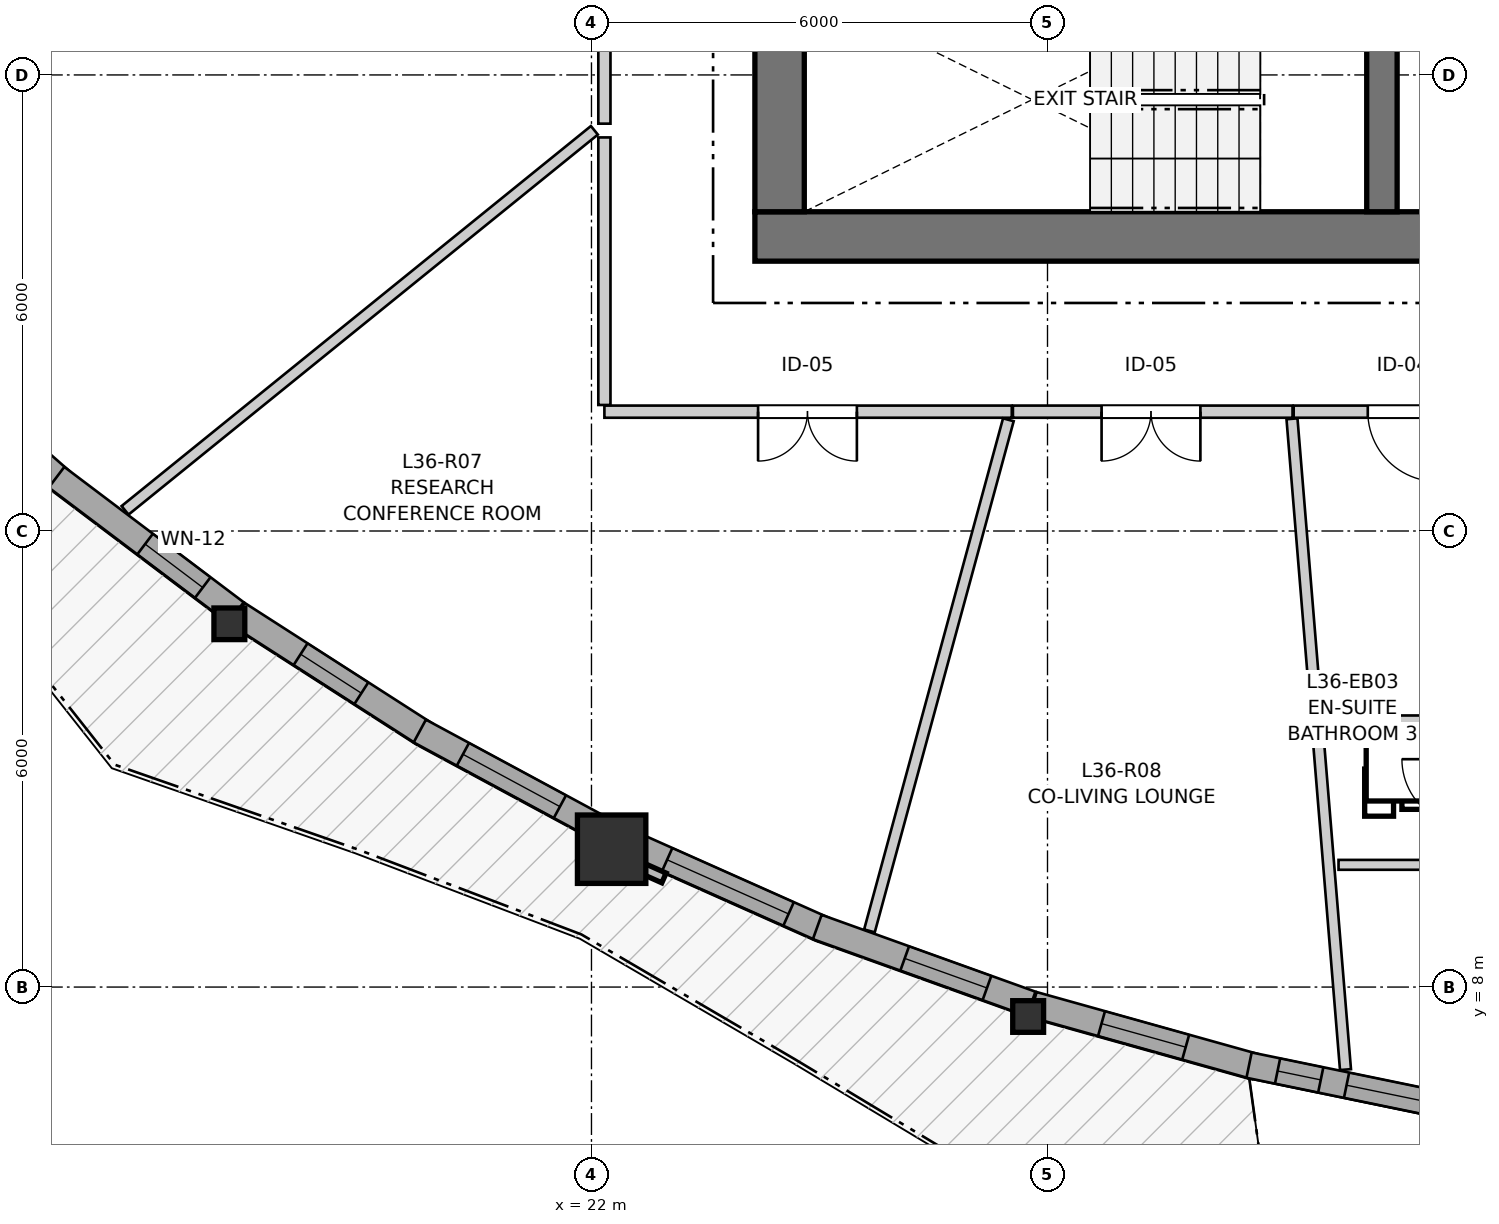
"""IFC4 building model, lengths in metres.
Left out: names, types, materials, properties, quantities, classifications, styles, units other than length and angle.
Written with IfcOpenShell. Run it as: python <this file> out.ifc"""

import sys

from ifc_helpers import new_model, si_unit, direction, frame, frame_2d, origin, origin_2d, place, context, subcontext, project, spatial, rectangle, i_section, extrude, source, transform, mapped, element, fill, save


model = new_model("IFC4")
c1 = context("Model", 3, precision=1e-05, world=origin(), true_north=direction((0.0, 1.0)))
c2 = subcontext(c1, "Body", "Model", "MODEL_VIEW")
j1 = project(units=[si_unit("LENGTHUNIT", "METRE"), si_unit("PLANEANGLEUNIT", "RADIAN")], contexts=[c1])
p1 = place(None, origin())
s1 = spatial("IfcSite", under=j1, at=p1, CompositionType="ELEMENT")
p2 = place(p1, origin())
s2 = spatial("IfcBuilding", under=s1, at=p2, CompositionType="ELEMENT")
p3 = place(p2, frame((0.0, 0.0, 121.6)))
s3 = spatial("IfcBuildingStorey", under=s2, at=p3, CompositionType="ELEMENT", Elevation=121.6)
p4 = place(p3, frame((24.15, 17.875, 0.0), z_axis=(0.0, 0.0, 1.0), x_axis=(1.0, 0.0, 0.0)))
e1 = element("IfcWall", 1, at=p4, inside=s3, PredefinedType="SHEAR", context=c2, shape_type="SweptSolid", body=[
    extrude(rectangle(XDim=12.4, YDim=0.65, at=frame_2d((6.2, 0.0))), origin(), (0.0, 0.0, 1.0), 2.95),
])
p5 = place(p3, frame((24.475, 33.8, 0.0), z_axis=(0.0, 0.0, 1.0), x_axis=(0.0, -1.0, 0.0)))
e2 = element("IfcWall", 2, at=p5, inside=s3, PredefinedType="SHEAR", context=c2, shape_type="SweptSolid", body=[
    extrude(rectangle(XDim=15.6, YDim=0.65, at=frame_2d((7.8, 0.0))), origin(), (0.0, 0.0, 1.0), 2.95),
])
p6 = place(p5, frame((7.05, 0.0, 0.0)))
e3 = element("IfcOpeningElement", 3, at=p6, cuts=e2, PredefinedType="OPENING", context=c2, shape_type="SweptSolid", body=[
    extrude(rectangle(XDim=1.5, YDim=2.15, at=frame_2d((0.75, 1.075))), frame((0.0, 0.335, 0.0), z_axis=(0.0, -1.0, 0.0), x_axis=(1.0, 0.0, 0.0)), (0.0, 0.0, 1.0), 0.67),
])
p7 = place(p5, frame((3.52, 0.0, 0.0)))
e4 = element("IfcOpeningElement", 4, at=p7, cuts=e2, PredefinedType="OPENING", context=c2, shape_type="SweptSolid", body=[
    extrude(rectangle(XDim=0.86, YDim=2.05, at=frame_2d((0.43, 1.025))), frame((0.0, 0.335, 0.0), z_axis=(0.0, -1.0, 0.0), x_axis=(1.0, 0.0, 0.0)), (0.0, 0.0, 1.0), 0.67),
])
p8 = place(p5, frame((11.22, 0.0, 0.0)))
e5 = element("IfcOpeningElement", 5, at=p8, cuts=e2, PredefinedType="OPENING", context=c2, shape_type="SweptSolid", body=[
    extrude(rectangle(XDim=0.86, YDim=2.05, at=frame_2d((0.43, 1.025))), frame((0.0, 0.335, 0.0), z_axis=(0.0, -1.0, 0.0), x_axis=(1.0, 0.0, 0.0)), (0.0, 0.0, 1.0), 0.67),
])
p9 = place(p3, frame((32.4, 18.2, 0.0), z_axis=(0.0, 0.0, 1.0), x_axis=(0.0, 1.0, 0.0)))
e6 = element("IfcWall", 6, at=p9, inside=s3, PredefinedType="SHEAR", context=c2, shape_type="SweptSolid", body=[
    extrude(rectangle(XDim=2.95, YDim=0.4, at=frame_2d((1.475, 0.0))), origin(), (0.0, 0.0, 1.0), 2.95),
])
m1 = source(origin(), c2, "Body", "SweptSolid", [
    extrude(i_section(OverallWidth=0.406, OverallDepth=0.416, WebThickness=0.027, FlangeThickness=0.044, FilletRadius=0.015, at=origin_2d()), origin(), (0.0, 0.0, 1.0), 2.95),
])
p10 = place(p3, frame((17.236, 12.779, 0.0), z_axis=(0.0, 0.0, 1.0), x_axis=(1.0, 0.0, 0.0)))
e7 = element("IfcColumn", 7, at=p10, inside=s3, PredefinedType="PILASTER", context=c2, shape_type="MappedRepresentation", body=[
    mapped(m1, transform((0.0, 0.0, 0.0), x_axis=(1.0, 0.0, 0.0), y_axis=(0.0, 1.0, 0.0), z_axis=(0.0, 0.0, 1.0), scale=1.0)),
])
m2 = source(origin(), c2, "Body", "SweptSolid", [
    extrude(rectangle(XDim=0.9, YDim=0.9, at=origin_2d()), origin(), (0.0, 0.0, 1.0), 2.95),
])
p11 = place(p3, frame((22.265, 9.814, 0.0), z_axis=(0.0, 0.0, 1.0), x_axis=(1.0, 0.0, 0.0)))
e8 = element("IfcColumn", 8, at=p11, inside=s3, PredefinedType="COLUMN", context=c2, shape_type="MappedRepresentation", body=[
    mapped(m2, transform((0.0, 0.0, 0.0), x_axis=(1.0, 0.0, 0.0), y_axis=(0.0, 1.0, 0.0), z_axis=(0.0, 0.0, 1.0), scale=1.0)),
])
p12 = place(p3, frame((27.746, 7.613, 0.0), z_axis=(0.0, 0.0, 1.0), x_axis=(1.0, 0.0, 0.0)))
e9 = element("IfcColumn", 9, at=p12, inside=s3, PredefinedType="PILASTER", context=c2, shape_type="MappedRepresentation", body=[
    mapped(m1, transform((0.0, 0.0, 0.0), x_axis=(1.0, 0.0, 0.0), y_axis=(0.0, 1.0, 0.0), z_axis=(0.0, 0.0, 1.0), scale=1.0)),
])
p13 = place(p3, frame((12.942, 16.485, 0.0), z_axis=(0.0, 0.0, 1.0), x_axis=(0.751427478967, -0.659815689305, 0.0)))
e10 = element("IfcWall", 10, at=p13, inside=s3, PredefinedType="SOLIDWALL", context=c2, shape_type="SweptSolid", body=[
    extrude(rectangle(XDim=2.78, YDim=0.34, at=frame_2d((1.39, 0.0))), origin(), (0.0, 0.0, 1.0), 2.48),
])
p14 = place(p13, frame((0.685, 0.0, 0.82)))
e11 = element("IfcOpeningElement", 11, at=p14, cuts=e10, PredefinedType="OPENING", context=c2, shape_type="SweptSolid", body=[
    extrude(rectangle(XDim=1.4, YDim=1.35, at=frame_2d((0.7, 0.675))), frame((0.0, 0.18, 0.0), z_axis=(0.0, -1.0, 0.0), x_axis=(1.0, 0.0, 0.0)), (0.0, 0.0, 1.0), 0.36),
])
p15 = place(p3, frame((14.962, 14.707, 0.0), z_axis=(0.0, 0.0, 1.0), x_axis=(0.798341968257, -0.602204368732, 0.0)))
e12 = element("IfcWall", 12, at=p15, inside=s3, PredefinedType="SOLIDWALL", context=c2, shape_type="SweptSolid", body=[
    extrude(rectangle(XDim=2.956, YDim=0.34, at=frame_2d((1.478, 0.0))), origin(), (0.0, 0.0, 1.0), 2.48),
])
p16 = place(p15, frame((1.46, 0.0, 0.82)))
e13 = element("IfcOpeningElement", 13, at=p16, cuts=e12, PredefinedType="OPENING", context=c2, shape_type="SweptSolid", body=[
    extrude(rectangle(XDim=0.95, YDim=1.35, at=frame_2d((0.475, 0.675))), frame((0.0, 0.18, 0.0), z_axis=(0.0, -1.0, 0.0), x_axis=(1.0, 0.0, 0.0)), (0.0, 0.0, 1.0), 0.36),
])
p17 = place(p3, frame((17.344, 12.912, 0.0), z_axis=(0.0, 0.0, 1.0), x_axis=(0.841496750769, -0.540262175657, 0.0)))
e14 = element("IfcWall", 14, at=p17, inside=s3, PredefinedType="SOLIDWALL", context=c2, shape_type="SweptSolid", body=[
    extrude(rectangle(XDim=2.939, YDim=0.34, at=frame_2d((1.47, 0.0))), origin(), (0.0, 0.0, 1.0), 2.48),
])
p18 = place(p17, frame((0.985, 0.0, 0.82)))
e15 = element("IfcOpeningElement", 15, at=p18, cuts=e14, PredefinedType="OPENING", context=c2, shape_type="SweptSolid", body=[
    extrude(rectangle(XDim=0.95, YDim=1.35, at=frame_2d((0.475, 0.675))), frame((0.0, 0.18, 0.0), z_axis=(0.0, -1.0, 0.0), x_axis=(1.0, 0.0, 0.0)), (0.0, 0.0, 1.0), 0.36),
])
p19 = place(p3, frame((19.741, 11.369, 0.0), z_axis=(0.0, 0.0, 1.0), x_axis=(0.88007734826, -0.474830349788, 0.0)))
e16 = element("IfcWall", 16, at=p19, inside=s3, PredefinedType="SOLIDWALL", context=c2, shape_type="SweptSolid", body=[
    extrude(rectangle(XDim=2.73, YDim=0.34, at=frame_2d((1.365, 0.0))), origin(), (0.0, 0.0, 1.0), 2.48),
])
p20 = place(p19, frame((0.645, 0.0, 0.82)))
e17 = element("IfcOpeningElement", 17, at=p20, cuts=e16, PredefinedType="OPENING", context=c2, shape_type="SweptSolid", body=[
    extrude(rectangle(XDim=1.45, YDim=1.25, at=frame_2d((0.725, 0.625))), frame((0.0, 0.18, 0.0), z_axis=(0.0, -1.0, 0.0), x_axis=(1.0, 0.0, 0.0)), (0.0, 0.0, 1.0), 0.36),
])
p21 = place(p3, frame((22.544, 9.875, 0.0), z_axis=(0.0, 0.0, 1.0), x_axis=(0.913404185574, -0.407053797153, 0.0)))
e18 = element("IfcWall", 18, at=p21, inside=s3, PredefinedType="SOLIDWALL", context=c2, shape_type="SweptSolid", body=[
    extrude(rectangle(XDim=2.746, YDim=0.34, at=frame_2d((1.373, 0.0))), origin(), (0.0, 0.0, 1.0), 2.48),
])
p22 = place(p21, frame((0.493, 0.0, 0.82)))
e19 = element("IfcOpeningElement", 19, at=p22, cuts=e18, PredefinedType="OPENING", context=c2, shape_type="SweptSolid", body=[
    extrude(rectangle(XDim=1.75, YDim=1.3, at=frame_2d((0.875, 0.65))), frame((0.0, 0.18, 0.0), z_axis=(0.0, -1.0, 0.0), x_axis=(1.0, 0.0, 0.0)), (0.0, 0.0, 1.0), 0.36),
])
p23 = place(p3, frame((24.971, 8.79, 0.0), z_axis=(0.0, 0.0, 1.0), x_axis=(0.941086086789, -0.338167084814, 0.0)))
e20 = element("IfcWall", 20, at=p23, inside=s3, PredefinedType="SOLIDWALL", context=c2, shape_type="SweptSolid", body=[
    extrude(rectangle(XDim=2.99, YDim=0.34, at=frame_2d((1.495, 0.0))), origin(), (0.0, 0.0, 1.0), 2.48),
])
p24 = place(p23, frame((1.222, 0.0, 0.82)))
e21 = element("IfcOpeningElement", 21, at=p24, cuts=e20, PredefinedType="OPENING", context=c2, shape_type="SweptSolid", body=[
    extrude(rectangle(XDim=1.15, YDim=1.2, at=frame_2d((0.575, 0.6))), frame((0.0, 0.18, 0.0), z_axis=(0.0, -1.0, 0.0), x_axis=(1.0, 0.0, 0.0)), (0.0, 0.0, 1.0), 0.36),
])
p25 = place(p3, frame((27.811, 7.771, 0.0), z_axis=(0.0, 0.0, 1.0), x_axis=(0.963039905189, -0.269358758934, 0.0)))
e22 = element("IfcWall", 22, at=p25, inside=s3, PredefinedType="SOLIDWALL", context=c2, shape_type="SweptSolid", body=[
    extrude(rectangle(XDim=3.039, YDim=0.34, at=frame_2d((1.52, 0.0))), origin(), (0.0, 0.0, 1.0), 2.48),
])
p26 = place(p25, frame((0.935, 0.0, 0.82)))
e23 = element("IfcOpeningElement", 23, at=p26, cuts=e22, PredefinedType="OPENING", context=c2, shape_type="SweptSolid", body=[
    extrude(rectangle(XDim=1.15, YDim=1.2, at=frame_2d((0.575, 0.6))), frame((0.0, 0.18, 0.0), z_axis=(0.0, -1.0, 0.0), x_axis=(1.0, 0.0, 0.0)), (0.0, 0.0, 1.0), 0.36),
])
p27 = place(p3, frame((30.652, 6.973, 0.0), z_axis=(0.0, 0.0, 1.0), x_axis=(0.979418300652, -0.201841007595, 0.0)))
e24 = element("IfcWall", 24, at=p27, inside=s3, PredefinedType="SOLIDWALL", context=c2, shape_type="SweptSolid", body=[
    extrude(rectangle(XDim=2.893, YDim=0.34, at=frame_2d((1.447, 0.0))), origin(), (0.0, 0.0, 1.0), 2.48),
])
p28 = place(p27, frame((0.383, 0.0, 0.82)))
e25 = element("IfcOpeningElement", 25, at=p28, cuts=e24, PredefinedType="OPENING", context=c2, shape_type="SweptSolid", body=[
    extrude(rectangle(XDim=0.58, YDim=1.35, at=frame_2d((0.29, 0.675))), frame((0.0, 0.18, 0.0), z_axis=(0.0, -1.0, 0.0), x_axis=(1.0, 0.0, 0.0)), (0.0, 0.0, 1.0), 0.36),
])
p29 = place(p27, frame((1.31, 0.0, 0.82)))
e26 = element("IfcOpeningElement", 26, at=p29, cuts=e24, PredefinedType="OPENING", context=c2, shape_type="SweptSolid", body=[
    extrude(rectangle(XDim=1.15, YDim=1.2, at=frame_2d((0.575, 0.6))), frame((0.0, 0.18, 0.0), z_axis=(0.0, -1.0, 0.0), x_axis=(1.0, 0.0, 0.0)), (0.0, 0.0, 1.0), 0.36),
])
p30 = place(p3, frame((27.53, 15.57, 0.0), z_axis=(0.0, 0.0, 1.0), x_axis=(-1.0, 0.0, 0.0)))
e27 = element("IfcWall", 27, at=p30, inside=s3, PredefinedType="PARTITIONING", context=c2, shape_type="SweptSolid", body=[
    extrude(rectangle(XDim=5.36, YDim=0.16, at=frame_2d((2.68, 0.0))), origin(), (0.0, 0.0, 1.0), 2.95),
])
p31 = place(p30, frame((2.038, 0.0, 0.0)))
e28 = element("IfcOpeningElement", 28, at=p31, cuts=e27, PredefinedType="OPENING", context=c2, shape_type="SweptSolid", body=[
    extrude(rectangle(XDim=1.3, YDim=2.1, at=frame_2d((0.65, 1.05))), frame((0.0, 0.09, 0.0), z_axis=(0.0, -1.0, 0.0), x_axis=(1.0, 0.0, 0.0)), (0.0, 0.0, 1.0), 0.18),
])
p32 = place(p3, frame((22.17, 19.359, 0.0), z_axis=(0.0, 0.0, 1.0), x_axis=(0.0, 1.0, 0.0)))
e29 = element("IfcWall", 29, at=p32, inside=s3, PredefinedType="PARTITIONING", context=c2, shape_type="SweptSolid", body=[
    extrude(rectangle(XDim=4.791, YDim=0.16, at=frame_2d((2.396, 0.0))), origin(), (0.0, 0.0, 1.0), 2.95),
])
p33 = place(p32, frame((1.445, 0.0, 0.0)))
e30 = element("IfcOpeningElement", 30, at=p33, cuts=e29, PredefinedType="OPENING", context=c2, shape_type="SweptSolid", body=[
    extrude(rectangle(XDim=1.3, YDim=2.1, at=frame_2d((0.65, 1.05))), frame((0.0, 0.09, 0.0), z_axis=(0.0, -1.0, 0.0), x_axis=(1.0, 0.0, 0.0)), (0.0, 0.0, 1.0), 0.18),
])
p34 = place(p3, frame((31.224, 15.57, 0.0), z_axis=(0.0, 0.0, 1.0), x_axis=(-1.0, 0.0, 0.0)))
e31 = element("IfcWall", 31, at=p34, inside=s3, PredefinedType="PARTITIONING", context=c2, shape_type="SweptSolid", body=[
    extrude(rectangle(XDim=3.679, YDim=0.16, at=frame_2d((1.84, 0.0))), origin(), (0.0, 0.0, 1.0), 2.95),
])
p35 = place(p34, frame((1.212, 0.0, 0.0)))
e32 = element("IfcOpeningElement", 32, at=p35, cuts=e31, PredefinedType="OPENING", context=c2, shape_type="SweptSolid", body=[
    extrude(rectangle(XDim=1.3, YDim=2.1, at=frame_2d((0.65, 1.05))), frame((0.0, 0.09, 0.0), z_axis=(0.0, -1.0, 0.0), x_axis=(1.0, 0.0, 0.0)), (0.0, 0.0, 1.0), 0.18),
])
p36 = place(p3, frame((34.108, 15.57, 0.0), z_axis=(0.0, 0.0, 1.0), x_axis=(-1.0, 0.0, 0.0)))
e33 = element("IfcWall", 33, at=p36, inside=s3, PredefinedType="PARTITIONING", context=c2, shape_type="SweptSolid", body=[
    extrude(rectangle(XDim=2.869, YDim=0.16, at=frame_2d((1.435, 0.0))), origin(), (0.0, 0.0, 1.0), 2.95),
])
p37 = place(p36, frame((0.974, 0.0, 0.0)))
e34 = element("IfcOpeningElement", 34, at=p37, cuts=e33, PredefinedType="OPENING", context=c2, shape_type="SweptSolid", body=[
    extrude(rectangle(XDim=0.92, YDim=2.1, at=frame_2d((0.46, 1.05))), frame((0.0, 0.09, 0.0), z_axis=(0.0, -1.0, 0.0), x_axis=(1.0, 0.0, 0.0)), (0.0, 0.0, 1.0), 0.18),
])
p38 = place(p3, frame((31.217, 15.476, 0.0), z_axis=(0.0, 0.0, 1.0), x_axis=(0.081928316893, -0.996638224679, 0.0)))
e35 = element("IfcWall", 35, at=p38, inside=s3, PredefinedType="PARTITIONING", context=c2, shape_type="SweptSolid", body=[
    extrude(rectangle(XDim=8.591, YDim=0.145, at=frame_2d((4.295, 0.0))), origin(), (0.0, 0.0, 1.0), 2.95),
])
p39 = place(p3, frame((15.863, 14.272, 0.0), z_axis=(0.0, 0.0, 1.0), x_axis=(0.77720694169, 0.629245079273, 0.0)))
e36 = element("IfcWall", 36, at=p39, inside=s3, PredefinedType="PARTITIONING", context=c2, shape_type="SweptSolid", body=[
    extrude(rectangle(XDim=7.945, YDim=0.145, at=frame_2d((3.972, 0.0))), origin(), (0.0, 0.0, 1.0), 2.95),
])
p40 = place(p3, frame((25.657, 8.739, 0.0), z_axis=(0.0, 0.0, 1.0), x_axis=(0.26231095786, 0.964983399539, 0.0)))
e37 = element("IfcWall", 37, at=p40, inside=s3, PredefinedType="PARTITIONING", context=c2, shape_type="SweptSolid", body=[
    extrude(rectangle(XDim=6.968, YDim=0.145, at=frame_2d((3.484, 0.0))), origin(), (0.0, 0.0, 1.0), 2.95),
])
p41 = place(p3, frame((22.17, 15.658, 0.0), z_axis=(0.0, 0.0, 1.0), x_axis=(0.0, 1.0, 0.0)))
e38 = element("IfcWall", 38, at=p41, inside=s3, PredefinedType="PARTITIONING", context=c2, shape_type="SweptSolid", body=[
    extrude(rectangle(XDim=3.52, YDim=0.16, at=frame_2d((1.76, 0.0))), origin(), (0.0, 0.0, 1.0), 2.95),
])
p42 = place(p3, frame((31.743, 11.508, 0.0), z_axis=(0.0, 0.0, 1.0), x_axis=(1.0, 0.0, 0.0)))
e39 = element("IfcWall", 39, at=p42, inside=s3, PredefinedType="PARTITIONING", context=c2, shape_type="SweptSolid", body=[
    extrude(rectangle(XDim=1.727, YDim=0.13, at=frame_2d((0.864, 0.0))), origin(), (0.0, 0.0, 1.0), 2.95),
])
p43 = place(p3, frame((31.829, 9.608, 0.0), z_axis=(0.0, 0.0, 1.0), x_axis=(1.0, 0.0, 0.0)))
e40 = element("IfcWall", 40, at=p43, inside=s3, PredefinedType="PARTITIONING", context=c2, shape_type="SweptSolid", body=[
    extrude(rectangle(XDim=1.641, YDim=0.13, at=frame_2d((0.82, 0.0))), origin(), (0.0, 0.0, 1.0), 2.558),
])
m3 = source(origin(), c2, "Body", "SweptSolid", [
    extrude(rectangle(XDim=0.95, YDim=1.35, at=frame_2d((0.475, 0.675))), frame((0.0, 0.03, 0.0), z_axis=(0.0, -1.0, 0.0), x_axis=(1.0, 0.0, 0.0)), (0.0, 0.0, 1.0), 0.06),
])
p44 = place(p16, origin())
e41 = element("IfcWindow", 41, at=p44, inside=s3, PartitioningType="SINGLE_PANEL", PredefinedType="WINDOW", context=c2, shape_type="MappedRepresentation", body=[
    mapped(m3, transform((0.0, 0.0, 0.0), x_axis=(1.0, 0.0, 0.0), y_axis=(0.0, 1.0, 0.0), z_axis=(0.0, 0.0, 1.0), scale=1.0)),
])
fill(e13, e41)
p45 = place(p18, origin())
e42 = element("IfcWindow", 42, at=p45, inside=s3, PartitioningType="SINGLE_PANEL", PredefinedType="WINDOW", context=c2, shape_type="MappedRepresentation", body=[
    mapped(m3, transform((0.0, 0.0, 0.0), x_axis=(1.0, 0.0, 0.0), y_axis=(0.0, 1.0, 0.0), z_axis=(0.0, 0.0, 1.0), scale=1.0)),
])
fill(e15, e42)
m4 = source(origin(), c2, "Body", "SweptSolid", [
    extrude(rectangle(XDim=1.45, YDim=1.25, at=frame_2d((0.725, 0.625))), frame((0.0, 0.03, 0.0), z_axis=(0.0, -1.0, 0.0), x_axis=(1.0, 0.0, 0.0)), (0.0, 0.0, 1.0), 0.06),
])
p46 = place(p20, origin())
e43 = element("IfcWindow", 43, at=p46, inside=s3, PartitioningType="SINGLE_PANEL", PredefinedType="WINDOW", context=c2, shape_type="MappedRepresentation", body=[
    mapped(m4, transform((0.0, 0.0, 0.0), x_axis=(1.0, 0.0, 0.0), y_axis=(0.0, 1.0, 0.0), z_axis=(0.0, 0.0, 1.0), scale=1.0)),
])
fill(e17, e43)
m5 = source(origin(), c2, "Body", "SweptSolid", [
    extrude(rectangle(XDim=1.75, YDim=1.3, at=frame_2d((0.875, 0.65))), frame((0.0, 0.03, 0.0), z_axis=(0.0, -1.0, 0.0), x_axis=(1.0, 0.0, 0.0)), (0.0, 0.0, 1.0), 0.06),
])
p47 = place(p22, origin())
e44 = element("IfcWindow", 44, at=p47, inside=s3, PartitioningType="SINGLE_PANEL", PredefinedType="WINDOW", context=c2, shape_type="MappedRepresentation", body=[
    mapped(m5, transform((0.0, 0.0, 0.0), x_axis=(1.0, 0.0, 0.0), y_axis=(0.0, 1.0, 0.0), z_axis=(0.0, 0.0, 1.0), scale=1.0)),
])
fill(e19, e44)
m6 = source(origin(), c2, "Body", "SweptSolid", [
    extrude(rectangle(XDim=1.15, YDim=1.2, at=frame_2d((0.575, 0.6))), frame((0.0, 0.03, 0.0), z_axis=(0.0, -1.0, 0.0), x_axis=(1.0, 0.0, 0.0)), (0.0, 0.0, 1.0), 0.06),
])
p48 = place(p24, origin())
e45 = element("IfcWindow", 45, at=p48, inside=s3, PartitioningType="SINGLE_PANEL", PredefinedType="WINDOW", context=c2, shape_type="MappedRepresentation", body=[
    mapped(m6, transform((0.0, 0.0, 0.0), x_axis=(1.0, 0.0, 0.0), y_axis=(0.0, 1.0, 0.0), z_axis=(0.0, 0.0, 1.0), scale=1.0)),
])
fill(e21, e45)
p49 = place(p26, origin())
e46 = element("IfcWindow", 46, at=p49, inside=s3, PartitioningType="SINGLE_PANEL", PredefinedType="WINDOW", context=c2, shape_type="MappedRepresentation", body=[
    mapped(m6, transform((0.0, 0.0, 0.0), x_axis=(1.0, 0.0, 0.0), y_axis=(0.0, 1.0, 0.0), z_axis=(0.0, 0.0, 1.0), scale=1.0)),
])
fill(e23, e46)
m7 = source(origin(), c2, "Body", "SweptSolid", [
    extrude(rectangle(XDim=0.58, YDim=1.35, at=frame_2d((0.29, 0.675))), frame((0.0, 0.03, 0.0), z_axis=(0.0, -1.0, 0.0), x_axis=(1.0, 0.0, 0.0)), (0.0, 0.0, 1.0), 0.06),
])
p50 = place(p28, origin())
e47 = element("IfcWindow", 47, at=p50, inside=s3, PartitioningType="SINGLE_PANEL", PredefinedType="WINDOW", context=c2, shape_type="MappedRepresentation", body=[
    mapped(m7, transform((0.0, 0.0, 0.0), x_axis=(1.0, 0.0, 0.0), y_axis=(0.0, 1.0, 0.0), z_axis=(0.0, 0.0, 1.0), scale=1.0)),
])
fill(e25, e47)
p51 = place(p29, origin())
e48 = element("IfcWindow", 48, at=p51, inside=s3, PartitioningType="SINGLE_PANEL", PredefinedType="WINDOW", context=c2, shape_type="MappedRepresentation", body=[
    mapped(m6, transform((0.0, 0.0, 0.0), x_axis=(1.0, 0.0, 0.0), y_axis=(0.0, 1.0, 0.0), z_axis=(0.0, 0.0, 1.0), scale=1.0)),
])
fill(e26, e48)
m8 = source(origin(), c2, "Body", "SweptSolid", [
    extrude(rectangle(XDim=1.3, YDim=2.1, at=frame_2d((0.65, 1.05))), frame((0.0, 0.025, 0.0), z_axis=(0.0, -1.0, 0.0), x_axis=(1.0, 0.0, 0.0)), (0.0, 0.0, 1.0), 0.05),
])
p52 = place(p31, origin())
e49 = element("IfcDoor", 49, at=p52, inside=s3, OperationType="DOUBLE_DOOR_SINGLE_SWING", PredefinedType="DOOR", context=c2, shape_type="MappedRepresentation", body=[
    mapped(m8, transform((0.0, 0.0, 0.0), x_axis=(1.0, 0.0, 0.0), y_axis=(0.0, 1.0, 0.0), z_axis=(0.0, 0.0, 1.0), scale=1.0)),
])
fill(e28, e49)
p53 = place(p35, origin())
e50 = element("IfcDoor", 50, at=p53, inside=s3, OperationType="DOUBLE_DOOR_SINGLE_SWING", PredefinedType="DOOR", context=c2, shape_type="MappedRepresentation", body=[
    mapped(m8, transform((0.0, 0.0, 0.0), x_axis=(1.0, 0.0, 0.0), y_axis=(0.0, 1.0, 0.0), z_axis=(0.0, 0.0, 1.0), scale=1.0)),
])
fill(e32, e50)
m9 = source(origin(), c2, "Body", "SweptSolid", [
    extrude(rectangle(XDim=0.92, YDim=2.1, at=frame_2d((0.46, 1.05))), frame((0.0, 0.025, 0.0), z_axis=(0.0, -1.0, 0.0), x_axis=(1.0, 0.0, 0.0)), (0.0, 0.0, 1.0), 0.05),
])
p54 = place(p37, origin())
e51 = element("IfcDoor", 51, at=p54, inside=s3, OperationType="SINGLE_SWING_LEFT", PredefinedType="DOOR", context=c2, shape_type="MappedRepresentation", body=[
    mapped(m9, transform((0.0, 0.0, 0.0), x_axis=(1.0, 0.0, 0.0), y_axis=(0.0, 1.0, 0.0), z_axis=(0.0, 0.0, 1.0), scale=1.0)),
])
fill(e34, e51)
save(model, sys.argv[1])
